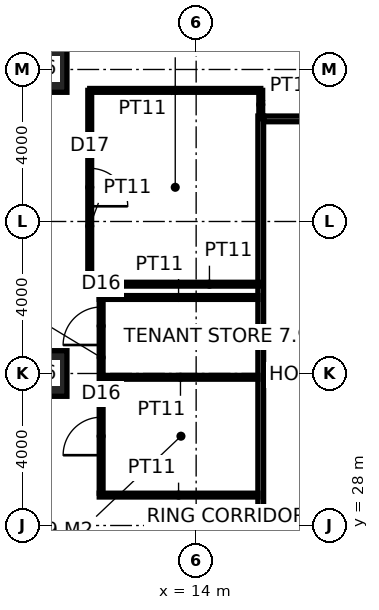
"""IFC4 building model, lengths in metres.
Left out: names, types, materials, properties, quantities, classifications, styles, units other than length and angle.
Written with IfcOpenShell. Run it as: python <this file> out.ifc"""

import sys

from ifc_helpers import new_model, si_unit, direction, frame, frame_2d, origin, origin_2d, place, context, subcontext, project, spatial, rectangle, hollow_rectangle, extrude, element, fill, save


model = new_model("IFC4")
c1 = context("Model", 3, precision=1e-05, world=origin(), true_north=direction((0.0, 1.0)))
c2 = subcontext(c1, "Body", "Model", "MODEL_VIEW")
j1 = project(units=[si_unit("LENGTHUNIT", "METRE"), si_unit("PLANEANGLEUNIT", "RADIAN")], contexts=[c1])
p1 = place(None, origin())
s1 = spatial("IfcSite", under=j1, at=p1, CompositionType="ELEMENT")
p2 = place(p1, origin())
s2 = spatial("IfcBuilding", under=s1, at=p2, CompositionType="ELEMENT")
p3 = place(p2, frame((0.0, 0.0, 39.0)))
s3 = spatial("IfcBuildingStorey", under=s2, at=p3, CompositionType="ELEMENT", Elevation=39.0)
for number, where, z_axis, x_axis in (
    (1, (10.0, 32.0, 0.0), (0.0, 0.0, 1.0), (1.0, 0.0, 0.0)),
    (2, (10.0, 40.0, 0.0), (0.0, 0.0, 1.0), (1.0, 0.0, 0.0)),
):
    element("IfcColumn", number, at=place(p3, frame(where, z_axis=z_axis, x_axis=x_axis)), inside=s3, PredefinedType="COLUMN", context=c2, shape_type="SweptSolid", body=[
        extrude(hollow_rectangle(XDim=1.2, YDim=1.2, WallThickness=0.125, at=origin_2d()), origin(), (0.0, 0.0, 1.0), 4.0),
    ])
p4 = place(p3, frame((15.7, 14.625, 0.0), z_axis=(0.0, 0.0, 1.0), x_axis=(0.0, 1.0, 0.0)))
e3 = element("IfcWall", 3, at=p4, inside=s3, PredefinedType="PARTITIONING", context=c2, shape_type="SweptSolid", body=[
    extrude(rectangle(XDim=24.15, YDim=0.15, at=frame_2d((12.075, 0.0))), origin(), (0.0, 0.0, 1.0), 3.85),
])
p5 = place(p4, frame((11.175, 0.0, 0.0)))
e4 = element("IfcOpeningElement", 4, at=p5, cuts=e3, PredefinedType="OPENING", context=c2, shape_type="SweptSolid", body=[
    extrude(rectangle(XDim=1.8, YDim=2.4, at=frame_2d((0.9, 1.2))), frame((0.0, 0.085, 0.0), z_axis=(0.0, -1.0, 0.0), x_axis=(1.0, 0.0, 0.0)), (0.0, 0.0, 1.0), 0.17),
])
p6 = place(p3, frame((15.775, 38.7, 0.0), z_axis=(0.0, 0.0, 1.0), x_axis=(1.0, 0.0, 0.0)))
e5 = element("IfcWall", 5, at=p6, inside=s3, PredefinedType="PARTITIONING", context=c2, shape_type="SweptSolid", body=[
    extrude(rectangle(XDim=28.45, YDim=0.15, at=frame_2d((14.225, 0.0))), origin(), (0.0, 0.0, 1.0), 3.85),
])
p7 = place(p6, frame((7.975, 0.0, 0.0)))
e6 = element("IfcOpeningElement", 6, at=p7, cuts=e5, PredefinedType="OPENING", context=c2, shape_type="SweptSolid", body=[
    extrude(rectangle(XDim=0.9, YDim=2.1, at=frame_2d((0.45, 1.05))), frame((0.0, 0.085, 0.0), z_axis=(0.0, -1.0, 0.0), x_axis=(1.0, 0.0, 0.0)), (0.0, 0.0, 1.0), 0.17),
])
p8 = place(p6, frame((11.725, 0.0, 0.0)))
e7 = element("IfcOpeningElement", 7, at=p8, cuts=e5, PredefinedType="OPENING", context=c2, shape_type="SweptSolid", body=[
    extrude(rectangle(XDim=1.0, YDim=2.1, at=frame_2d((0.5, 1.05))), frame((0.0, 0.085, 0.0), z_axis=(0.0, -1.0, 0.0), x_axis=(1.0, 0.0, 0.0)), (0.0, 0.0, 1.0), 0.17),
])
p9 = place(p6, frame((15.575, 0.0, 0.0)))
e8 = element("IfcOpeningElement", 8, at=p9, cuts=e5, PredefinedType="OPENING", context=c2, shape_type="SweptSolid", body=[
    extrude(rectangle(XDim=0.9, YDim=2.1, at=frame_2d((0.45, 1.05))), frame((0.0, 0.085, 0.0), z_axis=(0.0, -1.0, 0.0), x_axis=(1.0, 0.0, 0.0)), (0.0, 0.0, 1.0), 0.17),
])
p10 = place(p3, frame((11.45, 28.8, 0.0), z_axis=(0.0, 0.0, 1.0), x_axis=(1.0, 0.0, 0.0)))
e9 = element("IfcWall", 9, at=p10, inside=s3, PredefinedType="PARTITIONING", context=c2, shape_type="SweptSolid", body=[
    extrude(rectangle(XDim=4.175, YDim=0.1, at=frame_2d((2.087, 0.0))), origin(), (0.0, 0.0, 1.0), 3.85),
])
p11 = place(p3, frame((11.55, 31.9, 0.0), z_axis=(0.0, 0.0, 1.0), x_axis=(1.0, 0.0, 0.0)))
e10 = element("IfcWall", 10, at=p11, inside=s3, PredefinedType="PARTITIONING", context=c2, shape_type="SweptSolid", body=[
    extrude(rectangle(XDim=4.075, YDim=0.1, at=frame_2d((2.038, 0.0))), origin(), (0.0, 0.0, 1.0), 2.85),
])
p12 = place(p3, frame((11.45, 34.0, 0.0), z_axis=(0.0, 0.0, 1.0), x_axis=(1.0, 0.0, 0.0)))
e11 = element("IfcWall", 11, at=p12, inside=s3, PredefinedType="PARTITIONING", context=c2, shape_type="SweptSolid", body=[
    extrude(rectangle(XDim=4.175, YDim=0.1, at=frame_2d((2.087, 0.0))), origin(), (0.0, 0.0, 1.0), 3.85),
])
p13 = place(p3, frame((11.5, 28.85, 0.0), z_axis=(0.0, 0.0, 1.0), x_axis=(0.0, 1.0, 0.0)))
e12 = element("IfcWall", 12, at=p13, inside=s3, PredefinedType="PARTITIONING", context=c2, shape_type="SweptSolid", body=[
    extrude(rectangle(XDim=5.1, YDim=0.1, at=frame_2d((2.55, 0.0))), origin(), (0.0, 0.0, 1.0), 3.85),
])
p14 = place(p13, frame((1.0, 0.0, 0.0)))
e13 = element("IfcOpeningElement", 13, at=p14, cuts=e12, PredefinedType="OPENING", context=c2, shape_type="SweptSolid", body=[
    extrude(rectangle(XDim=1.0, YDim=2.2, at=frame_2d((0.5, 1.1))), frame((0.0, 0.06, 0.0), z_axis=(0.0, -1.0, 0.0), x_axis=(1.0, 0.0, 0.0)), (0.0, 0.0, 1.0), 0.12),
])
p15 = place(p13, frame((3.9, 0.0, 0.0)))
e14 = element("IfcOpeningElement", 14, at=p15, cuts=e12, PredefinedType="OPENING", context=c2, shape_type="SweptSolid", body=[
    extrude(rectangle(XDim=1.0, YDim=2.2, at=frame_2d((0.5, 1.1))), frame((0.0, 0.06, 0.0), z_axis=(0.0, -1.0, 0.0), x_axis=(1.0, 0.0, 0.0)), (0.0, 0.0, 1.0), 0.12),
])
p16 = place(p3, frame((15.7, 38.7, 0.0), z_axis=(0.0, 0.0, 1.0), x_axis=(0.0, 1.0, 0.0)))
e15 = element("IfcWall", 15, at=p16, inside=s3, PredefinedType="PARTITIONING", context=c2, shape_type="SweptSolid", body=[
    extrude(rectangle(XDim=0.75, YDim=0.1, at=frame_2d((0.375, 0.0))), origin(), (0.0, 0.0, 1.0), 3.85),
])
p17 = place(p3, frame((15.7, 39.45, 0.0), z_axis=(0.0, 0.0, 1.0), x_axis=(-1.0, 0.0, 0.0)))
e16 = element("IfcWall", 16, at=p17, inside=s3, PredefinedType="PARTITIONING", context=c2, shape_type="SweptSolid", body=[
    extrude(rectangle(XDim=4.5, YDim=0.1, at=frame_2d((2.25, 0.0))), origin(), (0.0, 0.0, 1.0), 3.85),
])
p18 = place(p3, frame((11.2, 39.45, 0.0), z_axis=(0.0, 0.0, 1.0), x_axis=(0.0, -1.0, 0.0)))
e17 = element("IfcWall", 17, at=p18, inside=s3, PredefinedType="PARTITIONING", context=c2, shape_type="SweptSolid", body=[
    extrude(rectangle(XDim=5.1, YDim=0.1, at=frame_2d((2.55, 0.0))), origin(), (0.0, 0.0, 1.0), 3.85),
])
p19 = place(p18, frame((2.05, 0.0, 0.0)))
e18 = element("IfcOpeningElement", 18, at=p19, cuts=e17, PredefinedType="OPENING", context=c2, shape_type="SweptSolid", body=[
    extrude(rectangle(XDim=1.0, YDim=2.2, at=frame_2d((0.5, 1.1))), frame((0.0, 0.06, 0.0), z_axis=(0.0, -1.0, 0.0), x_axis=(1.0, 0.0, 0.0)), (0.0, 0.0, 1.0), 0.12),
])
p20 = place(p3, frame((11.2, 34.35, 0.0), z_axis=(0.0, 0.0, 1.0), x_axis=(1.0, 0.0, 0.0)))
e19 = element("IfcWall", 19, at=p20, inside=s3, PredefinedType="PARTITIONING", context=c2, shape_type="SweptSolid", body=[
    extrude(rectangle(XDim=4.5, YDim=0.1, at=frame_2d((2.25, 0.0))), origin(), (0.0, 0.0, 1.0), 3.85),
])
p21 = place(p14, origin())
e20 = element("IfcDoor", 20, at=p21, inside=s3, OperationType="SINGLE_SWING_LEFT", PredefinedType="DOOR", context=c2, shape_type="SweptSolid", body=[
    extrude(rectangle(XDim=1.0, YDim=2.2, at=frame_2d((0.5, 1.1))), frame((0.0, 0.025, 0.0), z_axis=(0.0, -1.0, 0.0), x_axis=(1.0, 0.0, 0.0)), (0.0, 0.0, 1.0), 0.05),
])
fill(e13, e20)
p22 = place(p15, origin())
e21 = element("IfcDoor", 21, at=p22, inside=s3, OperationType="SINGLE_SWING_LEFT", PredefinedType="DOOR", context=c2, shape_type="SweptSolid", body=[
    extrude(rectangle(XDim=1.0, YDim=2.2, at=frame_2d((0.5, 1.1))), frame((0.0, 0.025, 0.0), z_axis=(0.0, -1.0, 0.0), x_axis=(1.0, 0.0, 0.0)), (0.0, 0.0, 1.0), 0.05),
])
fill(e14, e21)
p23 = place(p19, origin())
e22 = element("IfcDoor", 22, at=p23, inside=s3, OperationType="SINGLE_SWING_RIGHT", PredefinedType="DOOR", context=c2, shape_type="SweptSolid", body=[
    extrude(rectangle(XDim=1.0, YDim=2.2, at=frame_2d((0.5, 1.1))), frame((0.0, 0.025, 0.0), z_axis=(0.0, -1.0, 0.0), x_axis=(1.0, 0.0, 0.0)), (0.0, 0.0, 1.0), 0.05),
])
fill(e18, e22)
save(model, sys.argv[1])
